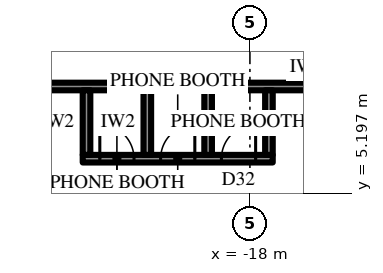
"""IFC4 building model, lengths in metres.
Left out: names, types, materials, properties, quantities, classifications, styles, units other than length and angle.
Written with IfcOpenShell. Run it as: python <this file> out.ifc"""

import sys

from ifc_helpers import new_model, si_unit, direction, frame, frame_2d, origin, place, context, subcontext, project, spatial, rectangle, extrude, element, fill, save


model = new_model("IFC4")
c1 = context("Model", 3, precision=1e-05, world=origin(), true_north=direction((0.0, 1.0)))
c2 = subcontext(c1, "Body", "Model", "MODEL_VIEW")
j1 = project(units=[si_unit("LENGTHUNIT", "METRE"), si_unit("PLANEANGLEUNIT", "RADIAN")], contexts=[c1])
p1 = place(None, origin())
s1 = spatial("IfcSite", under=j1, at=p1, CompositionType="ELEMENT")
p2 = place(p1, origin())
s2 = spatial("IfcBuilding", under=s1, at=p2, CompositionType="ELEMENT")
p3 = place(p2, frame((0.0, 0.0, 345.1)))
s3 = spatial("IfcBuildingStorey", under=s2, at=p3, CompositionType="ELEMENT", Elevation=345.1)
p4 = place(p3, frame((-12.425, 8.0, 0.0), z_axis=(0.0, 0.0, 1.0), x_axis=(-1.0, 0.0, 0.0)))
e1 = element("IfcWall", 1, at=p4, inside=s3, PredefinedType="PARTITIONING", context=c2, shape_type="SweptSolid", body=[
    extrude(rectangle(XDim=13.59, YDim=0.2, at=frame_2d((6.795, 0.0))), origin(), (0.0, 0.0, 1.0), 4.0),
])
p5 = place(p4, frame((0.859, 0.0, 0.0)))
e2 = element("IfcOpeningElement", 2, at=p5, cuts=e1, PredefinedType="OPENING", context=c2, shape_type="SweptSolid", body=[
    extrude(rectangle(XDim=1.0, YDim=2.2, at=frame_2d((0.5, 1.1))), frame((0.0, 0.11, 0.0), z_axis=(0.0, -1.0, 0.0), x_axis=(1.0, 0.0, 0.0)), (0.0, 0.0, 1.0), 0.22),
])
p6 = place(p3, frame((-17.4, 6.1, 0.0), z_axis=(0.0, 0.0, 1.0), x_axis=(-1.0, 0.0, 0.0)))
e3 = element("IfcWall", 3, at=p6, inside=s3, PredefinedType="PARTITIONING", context=c2, shape_type="SweptSolid", body=[
    extrude(rectangle(XDim=5.0, YDim=0.2, at=frame_2d((2.5, 0.0))), origin(), (0.0, 0.0, 1.0), 4.0),
])
p7 = place(p6, frame((0.45, 0.0, 0.0)))
e4 = element("IfcOpeningElement", 4, at=p7, cuts=e3, PredefinedType="OPENING", context=c2, shape_type="SweptSolid", body=[
    extrude(rectangle(XDim=0.9, YDim=2.2, at=frame_2d((0.45, 1.1))), frame((0.0, 0.11, 0.0), z_axis=(0.0, -1.0, 0.0), x_axis=(1.0, 0.0, 0.0)), (0.0, 0.0, 1.0), 0.22),
])
p8 = place(p6, frame((2.05, 0.0, 0.0)))
e5 = element("IfcOpeningElement", 5, at=p8, cuts=e3, PredefinedType="OPENING", context=c2, shape_type="SweptSolid", body=[
    extrude(rectangle(XDim=0.9, YDim=2.2, at=frame_2d((0.45, 1.1))), frame((0.0, 0.11, 0.0), z_axis=(0.0, -1.0, 0.0), x_axis=(1.0, 0.0, 0.0)), (0.0, 0.0, 1.0), 0.22),
])
p9 = place(p6, frame((3.65, 0.0, 0.0)))
e6 = element("IfcOpeningElement", 6, at=p9, cuts=e3, PredefinedType="OPENING", context=c2, shape_type="SweptSolid", body=[
    extrude(rectangle(XDim=0.9, YDim=2.2, at=frame_2d((0.45, 1.1))), frame((0.0, 0.11, 0.0), z_axis=(0.0, -1.0, 0.0), x_axis=(1.0, 0.0, 0.0)), (0.0, 0.0, 1.0), 0.22),
])
for number, where, z_axis, x_axis in (
    (7, (-17.5, 7.9, 0.0), (0.0, 0.0, 1.0), (0.0, -1.0, 0.0)),
    (8, (-19.1, 7.9, 0.0), (0.0, 0.0, 1.0), (0.0, -1.0, 0.0)),
    (9, (-20.7, 7.9, 0.0), (0.0, 0.0, 1.0), (0.0, -1.0, 0.0)),
    (10, (-22.3, 7.9, 0.0), (0.0, 0.0, 1.0), (0.0, -1.0, 0.0)),
):
    element("IfcWall", number, at=place(p3, frame(where, z_axis=z_axis, x_axis=x_axis)), inside=s3, PredefinedType="PARTITIONING", context=c2, shape_type="SweptSolid", body=[
        extrude(rectangle(XDim=1.7, YDim=0.2, at=frame_2d((0.85, 0.0))), origin(), (0.0, 0.0, 1.0), 4.0),
    ])
p10 = place(p7, frame((0.9, 0.0, 0.0), z_axis=(0.0, 0.0, 1.0), x_axis=(-1.0, 0.0, 0.0)))
e11 = element("IfcDoor", 11, at=p10, inside=s3, OperationType="SINGLE_SWING_LEFT", PredefinedType="DOOR", context=c2, shape_type="SweptSolid", body=[
    extrude(rectangle(XDim=0.9, YDim=2.2, at=frame_2d((0.45, 1.1))), frame((0.0, 0.025, 0.0), z_axis=(0.0, -1.0, 0.0), x_axis=(1.0, 0.0, 0.0)), (0.0, 0.0, 1.0), 0.05),
])
fill(e4, e11)
p11 = place(p8, frame((0.9, 0.0, 0.0), z_axis=(0.0, 0.0, 1.0), x_axis=(-1.0, 0.0, 0.0)))
e12 = element("IfcDoor", 12, at=p11, inside=s3, OperationType="SINGLE_SWING_LEFT", PredefinedType="DOOR", context=c2, shape_type="SweptSolid", body=[
    extrude(rectangle(XDim=0.9, YDim=2.2, at=frame_2d((0.45, 1.1))), frame((0.0, 0.025, 0.0), z_axis=(0.0, -1.0, 0.0), x_axis=(1.0, 0.0, 0.0)), (0.0, 0.0, 1.0), 0.05),
])
fill(e5, e12)
p12 = place(p9, frame((0.9, 0.0, 0.0), z_axis=(0.0, 0.0, 1.0), x_axis=(-1.0, 0.0, 0.0)))
e13 = element("IfcDoor", 13, at=p12, inside=s3, OperationType="SINGLE_SWING_RIGHT", PredefinedType="DOOR", context=c2, shape_type="SweptSolid", body=[
    extrude(rectangle(XDim=0.9, YDim=2.2, at=frame_2d((0.45, 1.1))), frame((0.0, 0.025, 0.0), z_axis=(0.0, -1.0, 0.0), x_axis=(1.0, 0.0, 0.0)), (0.0, 0.0, 1.0), 0.05),
])
fill(e6, e13)
save(model, sys.argv[1])
